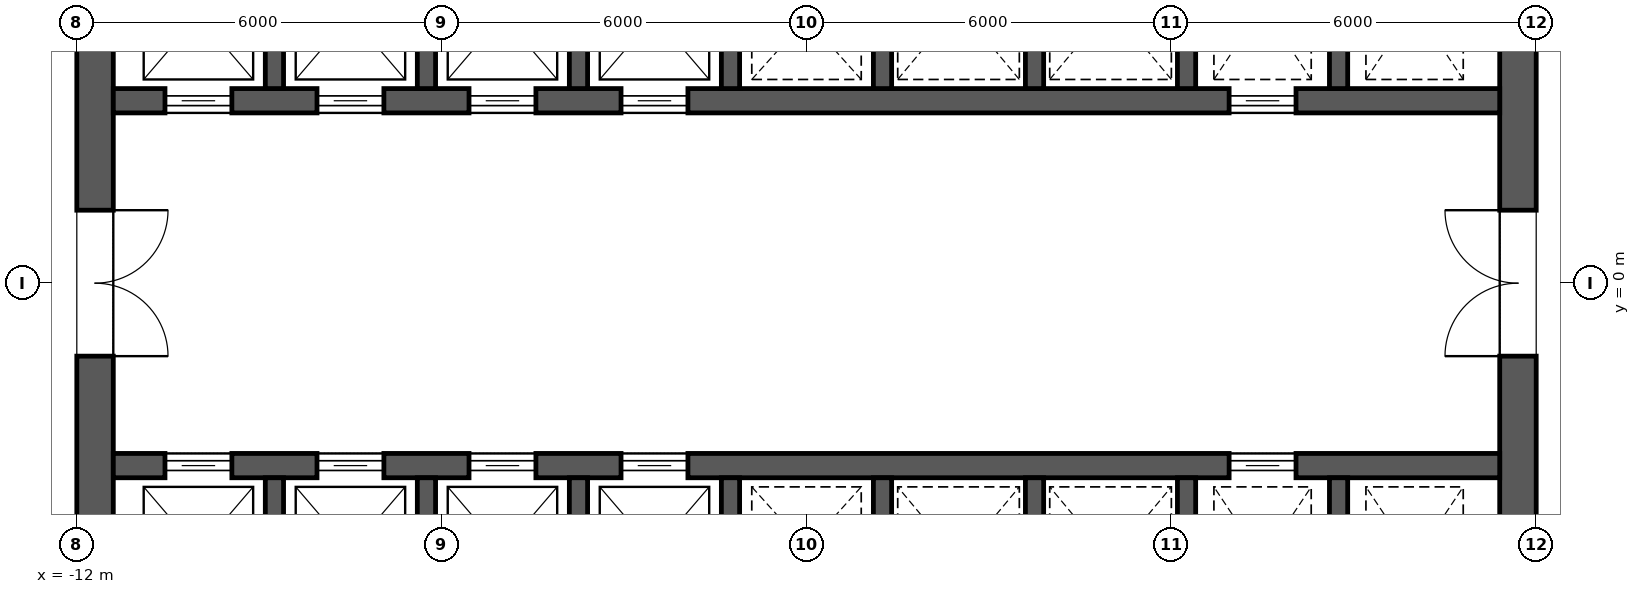
"""IFC4 building model, lengths in metres.
Left out: names, types, materials, properties, quantities, classifications, styles, units other than length and angle.
Written with IfcOpenShell. Run it as: python <this file> out.ifc"""

import sys

from ifc_helpers import new_model, si_unit, direction, frame, frame_2d, origin, place, context, subcontext, project, spatial, rectangle, extrude, element, fill, save


model = new_model("IFC4")
c1 = context("Model", 3, precision=1e-05, world=origin(), true_north=direction((0.0, 1.0)))
c2 = subcontext(c1, "Body", "Model", "MODEL_VIEW")
j1 = project(units=[si_unit("LENGTHUNIT", "METRE"), si_unit("PLANEANGLEUNIT", "RADIAN")], contexts=[c1])
p1 = place(None, origin())
s1 = spatial("IfcSite", under=j1, at=p1, CompositionType="ELEMENT")
p2 = place(p1, origin())
s2 = spatial("IfcBuilding", under=s1, at=p2, CompositionType="ELEMENT")
p3 = place(p2, frame((0.0, 0.0, 57.1)))
s3 = spatial("IfcBuildingStorey", under=s2, at=p3, CompositionType="ELEMENT", Elevation=57.1)
p4 = place(p3, frame((11.7, -11.4, 0.0), z_axis=(0.0, 0.0, 1.0), x_axis=(0.0, 1.0, 0.0)))
e1 = element("IfcWall", 1, at=p4, inside=s3, PredefinedType="SHEAR", context=c2, shape_type="SweptSolid", body=[
    extrude(rectangle(XDim=22.8, YDim=0.6, at=frame_2d((11.4, 0.0))), origin(), (0.0, 0.0, 1.0), 4.2),
])
p5 = place(p4, frame((10.2, 0.0, 0.0)))
e2 = element("IfcOpeningElement", 2, at=p5, cuts=e1, PredefinedType="OPENING", context=c2, shape_type="SweptSolid", body=[
    extrude(rectangle(XDim=2.4, YDim=2.1, at=frame_2d((1.2, 1.05))), frame((0.0, 0.312, 0.0), z_axis=(0.0, -1.0, 0.0), x_axis=(1.0, 0.0, 0.0)), (0.0, 0.0, 1.0), 0.624),
])
p6 = place(p4, frame((19.5, 0.0, 0.0)))
e3 = element("IfcOpeningElement", 3, at=p6, cuts=e1, PredefinedType="OPENING", context=c2, shape_type="SweptSolid", body=[
    extrude(rectangle(XDim=1.2, YDim=2.1, at=frame_2d((0.6, 1.05))), frame((0.0, 0.312, 0.0), z_axis=(0.0, -1.0, 0.0), x_axis=(1.0, 0.0, 0.0)), (0.0, 0.0, 1.0), 0.624),
])
p7 = place(p4, frame((2.1, 0.0, 0.0)))
e4 = element("IfcOpeningElement", 4, at=p7, cuts=e1, PredefinedType="OPENING", context=c2, shape_type="SweptSolid", body=[
    extrude(rectangle(XDim=1.2, YDim=2.1, at=frame_2d((0.6, 1.05))), frame((0.0, 0.312, 0.0), z_axis=(0.0, -1.0, 0.0), x_axis=(1.0, 0.0, 0.0)), (0.0, 0.0, 1.0), 0.624),
])
p8 = place(p3, frame((-11.7, -11.4, 0.0), z_axis=(0.0, 0.0, 1.0), x_axis=(0.0, 1.0, 0.0)))
e5 = element("IfcWall", 5, at=p8, inside=s3, PredefinedType="SHEAR", context=c2, shape_type="SweptSolid", body=[
    extrude(rectangle(XDim=22.8, YDim=0.6, at=frame_2d((11.4, 0.0))), origin(), (0.0, 0.0, 1.0), 4.2),
])
p9 = place(p8, frame((10.2, 0.0, 0.0)))
e6 = element("IfcOpeningElement", 6, at=p9, cuts=e5, PredefinedType="OPENING", context=c2, shape_type="SweptSolid", body=[
    extrude(rectangle(XDim=2.4, YDim=2.1, at=frame_2d((1.2, 1.05))), frame((0.0, 0.312, 0.0), z_axis=(0.0, -1.0, 0.0), x_axis=(1.0, 0.0, 0.0)), (0.0, 0.0, 1.0), 0.624),
])
p10 = place(p8, frame((18.925, 0.0, 0.0)))
e7 = element("IfcOpeningElement", 7, at=p10, cuts=e5, PredefinedType="OPENING", context=c2, shape_type="SweptSolid", body=[
    extrude(rectangle(XDim=1.2, YDim=2.1, at=frame_2d((0.6, 1.05))), frame((0.0, 0.312, 0.0), z_axis=(0.0, -1.0, 0.0), x_axis=(1.0, 0.0, 0.0)), (0.0, 0.0, 1.0), 0.624),
])
p11 = place(p8, frame((2.675, 0.0, 0.0)))
e8 = element("IfcOpeningElement", 8, at=p11, cuts=e5, PredefinedType="OPENING", context=c2, shape_type="SweptSolid", body=[
    extrude(rectangle(XDim=1.2, YDim=2.1, at=frame_2d((0.6, 1.05))), frame((0.0, 0.312, 0.0), z_axis=(0.0, -1.0, 0.0), x_axis=(1.0, 0.0, 0.0)), (0.0, 0.0, 1.0), 0.624),
])
p12 = place(p3, frame((-11.4, 3.0, 0.0), z_axis=(0.0, 0.0, 1.0), x_axis=(1.0, 0.0, 0.0)))
e9 = element("IfcWall", 9, at=p12, inside=s3, PredefinedType="SHEAR", context=c2, shape_type="SweptSolid", body=[
    extrude(rectangle(XDim=22.8, YDim=0.4, at=frame_2d((11.4, 0.0))), origin(), (0.0, 0.0, 1.0), 4.2),
])
p13 = place(p12, frame((0.85, 0.0, 0.0)))
e10 = element("IfcOpeningElement", 10, at=p13, cuts=e9, PredefinedType="OPENING", context=c2, shape_type="SweptSolid", body=[
    extrude(rectangle(XDim=1.1, YDim=2.1, at=frame_2d((0.55, 1.05))), frame((0.0, 0.212, 0.0), z_axis=(0.0, -1.0, 0.0), x_axis=(1.0, 0.0, 0.0)), (0.0, 0.0, 1.0), 0.424),
])
p14 = place(p12, frame((3.35, 0.0, 0.0)))
e11 = element("IfcOpeningElement", 11, at=p14, cuts=e9, PredefinedType="OPENING", context=c2, shape_type="SweptSolid", body=[
    extrude(rectangle(XDim=1.1, YDim=2.1, at=frame_2d((0.55, 1.05))), frame((0.0, 0.212, 0.0), z_axis=(0.0, -1.0, 0.0), x_axis=(1.0, 0.0, 0.0)), (0.0, 0.0, 1.0), 0.424),
])
p15 = place(p12, frame((5.85, 0.0, 0.0)))
e12 = element("IfcOpeningElement", 12, at=p15, cuts=e9, PredefinedType="OPENING", context=c2, shape_type="SweptSolid", body=[
    extrude(rectangle(XDim=1.1, YDim=2.1, at=frame_2d((0.55, 1.05))), frame((0.0, 0.212, 0.0), z_axis=(0.0, -1.0, 0.0), x_axis=(1.0, 0.0, 0.0)), (0.0, 0.0, 1.0), 0.424),
])
p16 = place(p12, frame((8.35, 0.0, 0.0)))
e13 = element("IfcOpeningElement", 13, at=p16, cuts=e9, PredefinedType="OPENING", context=c2, shape_type="SweptSolid", body=[
    extrude(rectangle(XDim=1.1, YDim=2.1, at=frame_2d((0.55, 1.05))), frame((0.0, 0.212, 0.0), z_axis=(0.0, -1.0, 0.0), x_axis=(1.0, 0.0, 0.0)), (0.0, 0.0, 1.0), 0.424),
])
p17 = place(p12, frame((18.35, 0.0, 0.0)))
e14 = element("IfcOpeningElement", 14, at=p17, cuts=e9, PredefinedType="OPENING", context=c2, shape_type="SweptSolid", body=[
    extrude(rectangle(XDim=1.1, YDim=2.1, at=frame_2d((0.55, 1.05))), frame((0.0, 0.212, 0.0), z_axis=(0.0, -1.0, 0.0), x_axis=(1.0, 0.0, 0.0)), (0.0, 0.0, 1.0), 0.424),
])
for number, where, z_axis, x_axis in (
    (15, (-8.75, 3.2, 0.0), (0.0, 0.0, 1.0), (0.0, 1.0, 0.0)),
    (16, (-6.25, 3.2, 0.0), (0.0, 0.0, 1.0), (0.0, 1.0, 0.0)),
    (17, (-3.75, 3.2, 0.0), (0.0, 0.0, 1.0), (0.0, 1.0, 0.0)),
    (18, (-1.25, 3.2, 0.0), (0.0, 0.0, 1.0), (0.0, 1.0, 0.0)),
    (19, (1.25, 3.2, 0.0), (0.0, 0.0, 1.0), (0.0, 1.0, 0.0)),
    (20, (3.75, 3.2, 0.0), (0.0, 0.0, 1.0), (0.0, 1.0, 0.0)),
    (21, (6.25, 3.2, 0.0), (0.0, 0.0, 1.0), (0.0, 1.0, 0.0)),
    (22, (8.75, 3.2, 0.0), (0.0, 0.0, 1.0), (0.0, 1.0, 0.0)),
):
    element("IfcWall", number, at=place(p3, frame(where, z_axis=z_axis, x_axis=x_axis)), inside=s3, PredefinedType="SHEAR", context=c2, shape_type="SweptSolid", body=[
        extrude(rectangle(XDim=2.9, YDim=0.3, at=frame_2d((1.45, 0.0))), origin(), (0.0, 0.0, 1.0), 4.2),
    ])
p18 = place(p3, frame((-11.4, -3.0, 0.0), z_axis=(0.0, 0.0, 1.0), x_axis=(1.0, 0.0, 0.0)))
e23 = element("IfcWall", 23, at=p18, inside=s3, PredefinedType="SHEAR", context=c2, shape_type="SweptSolid", body=[
    extrude(rectangle(XDim=22.8, YDim=0.4, at=frame_2d((11.4, 0.0))), origin(), (0.0, 0.0, 1.0), 4.2),
])
p19 = place(p18, frame((0.85, 0.0, 0.0)))
e24 = element("IfcOpeningElement", 24, at=p19, cuts=e23, PredefinedType="OPENING", context=c2, shape_type="SweptSolid", body=[
    extrude(rectangle(XDim=1.1, YDim=2.1, at=frame_2d((0.55, 1.05))), frame((0.0, 0.212, 0.0), z_axis=(0.0, -1.0, 0.0), x_axis=(1.0, 0.0, 0.0)), (0.0, 0.0, 1.0), 0.424),
])
p20 = place(p18, frame((3.35, 0.0, 0.0)))
e25 = element("IfcOpeningElement", 25, at=p20, cuts=e23, PredefinedType="OPENING", context=c2, shape_type="SweptSolid", body=[
    extrude(rectangle(XDim=1.1, YDim=2.1, at=frame_2d((0.55, 1.05))), frame((0.0, 0.212, 0.0), z_axis=(0.0, -1.0, 0.0), x_axis=(1.0, 0.0, 0.0)), (0.0, 0.0, 1.0), 0.424),
])
p21 = place(p18, frame((5.85, 0.0, 0.0)))
e26 = element("IfcOpeningElement", 26, at=p21, cuts=e23, PredefinedType="OPENING", context=c2, shape_type="SweptSolid", body=[
    extrude(rectangle(XDim=1.1, YDim=2.1, at=frame_2d((0.55, 1.05))), frame((0.0, 0.212, 0.0), z_axis=(0.0, -1.0, 0.0), x_axis=(1.0, 0.0, 0.0)), (0.0, 0.0, 1.0), 0.424),
])
p22 = place(p18, frame((8.35, 0.0, 0.0)))
e27 = element("IfcOpeningElement", 27, at=p22, cuts=e23, PredefinedType="OPENING", context=c2, shape_type="SweptSolid", body=[
    extrude(rectangle(XDim=1.1, YDim=2.1, at=frame_2d((0.55, 1.05))), frame((0.0, 0.212, 0.0), z_axis=(0.0, -1.0, 0.0), x_axis=(1.0, 0.0, 0.0)), (0.0, 0.0, 1.0), 0.424),
])
p23 = place(p18, frame((18.35, 0.0, 0.0)))
e28 = element("IfcOpeningElement", 28, at=p23, cuts=e23, PredefinedType="OPENING", context=c2, shape_type="SweptSolid", body=[
    extrude(rectangle(XDim=1.1, YDim=2.1, at=frame_2d((0.55, 1.05))), frame((0.0, 0.212, 0.0), z_axis=(0.0, -1.0, 0.0), x_axis=(1.0, 0.0, 0.0)), (0.0, 0.0, 1.0), 0.424),
])
for number, where, z_axis, x_axis in (
    (29, (-8.75, -6.1, 0.0), (0.0, 0.0, 1.0), (0.0, 1.0, 0.0)),
    (30, (-6.25, -6.1, 0.0), (0.0, 0.0, 1.0), (0.0, 1.0, 0.0)),
    (31, (-3.75, -6.1, 0.0), (0.0, 0.0, 1.0), (0.0, 1.0, 0.0)),
    (32, (-1.25, -6.1, 0.0), (0.0, 0.0, 1.0), (0.0, 1.0, 0.0)),
    (33, (1.25, -6.1, 0.0), (0.0, 0.0, 1.0), (0.0, 1.0, 0.0)),
    (34, (3.75, -6.1, 0.0), (0.0, 0.0, 1.0), (0.0, 1.0, 0.0)),
    (35, (6.25, -6.1, 0.0), (0.0, 0.0, 1.0), (0.0, 1.0, 0.0)),
    (36, (8.75, -6.1, 0.0), (0.0, 0.0, 1.0), (0.0, 1.0, 0.0)),
):
    element("IfcWall", number, at=place(p3, frame(where, z_axis=z_axis, x_axis=x_axis)), inside=s3, PredefinedType="SHEAR", context=c2, shape_type="SweptSolid", body=[
        extrude(rectangle(XDim=2.9, YDim=0.3, at=frame_2d((1.45, 0.0))), origin(), (0.0, 0.0, 1.0), 4.2),
    ])
p24 = place(p13, origin())
e37 = element("IfcDoor", 37, at=p24, inside=s3, OperationType="SLIDING_TO_LEFT", PredefinedType="DOOR", context=c2, shape_type="SweptSolid", body=[
    extrude(rectangle(XDim=1.1, YDim=2.1, at=frame_2d((0.55, 1.05))), frame((0.0, 0.025, 0.0), z_axis=(0.0, -1.0, 0.0), x_axis=(1.0, 0.0, 0.0)), (0.0, 0.0, 1.0), 0.05),
])
fill(e10, e37)
p25 = place(p14, origin())
e38 = element("IfcDoor", 38, at=p25, inside=s3, OperationType="SLIDING_TO_LEFT", PredefinedType="DOOR", context=c2, shape_type="SweptSolid", body=[
    extrude(rectangle(XDim=1.1, YDim=2.1, at=frame_2d((0.55, 1.05))), frame((0.0, 0.025, 0.0), z_axis=(0.0, -1.0, 0.0), x_axis=(1.0, 0.0, 0.0)), (0.0, 0.0, 1.0), 0.05),
])
fill(e11, e38)
p26 = place(p15, origin())
e39 = element("IfcDoor", 39, at=p26, inside=s3, OperationType="SLIDING_TO_LEFT", PredefinedType="DOOR", context=c2, shape_type="SweptSolid", body=[
    extrude(rectangle(XDim=1.1, YDim=2.1, at=frame_2d((0.55, 1.05))), frame((0.0, 0.025, 0.0), z_axis=(0.0, -1.0, 0.0), x_axis=(1.0, 0.0, 0.0)), (0.0, 0.0, 1.0), 0.05),
])
fill(e12, e39)
p27 = place(p16, origin())
e40 = element("IfcDoor", 40, at=p27, inside=s3, OperationType="SLIDING_TO_LEFT", PredefinedType="DOOR", context=c2, shape_type="SweptSolid", body=[
    extrude(rectangle(XDim=1.1, YDim=2.1, at=frame_2d((0.55, 1.05))), frame((0.0, 0.025, 0.0), z_axis=(0.0, -1.0, 0.0), x_axis=(1.0, 0.0, 0.0)), (0.0, 0.0, 1.0), 0.05),
])
fill(e13, e40)
p28 = place(p19, origin())
e41 = element("IfcDoor", 41, at=p28, inside=s3, OperationType="SLIDING_TO_LEFT", PredefinedType="DOOR", context=c2, shape_type="SweptSolid", body=[
    extrude(rectangle(XDim=1.1, YDim=2.1, at=frame_2d((0.55, 1.05))), frame((0.0, 0.025, 0.0), z_axis=(0.0, -1.0, 0.0), x_axis=(1.0, 0.0, 0.0)), (0.0, 0.0, 1.0), 0.05),
])
fill(e24, e41)
p29 = place(p20, origin())
e42 = element("IfcDoor", 42, at=p29, inside=s3, OperationType="SLIDING_TO_LEFT", PredefinedType="DOOR", context=c2, shape_type="SweptSolid", body=[
    extrude(rectangle(XDim=1.1, YDim=2.1, at=frame_2d((0.55, 1.05))), frame((0.0, 0.025, 0.0), z_axis=(0.0, -1.0, 0.0), x_axis=(1.0, 0.0, 0.0)), (0.0, 0.0, 1.0), 0.05),
])
fill(e25, e42)
p30 = place(p21, origin())
e43 = element("IfcDoor", 43, at=p30, inside=s3, OperationType="SLIDING_TO_LEFT", PredefinedType="DOOR", context=c2, shape_type="SweptSolid", body=[
    extrude(rectangle(XDim=1.1, YDim=2.1, at=frame_2d((0.55, 1.05))), frame((0.0, 0.025, 0.0), z_axis=(0.0, -1.0, 0.0), x_axis=(1.0, 0.0, 0.0)), (0.0, 0.0, 1.0), 0.05),
])
fill(e26, e43)
p31 = place(p22, origin())
e44 = element("IfcDoor", 44, at=p31, inside=s3, OperationType="SLIDING_TO_LEFT", PredefinedType="DOOR", context=c2, shape_type="SweptSolid", body=[
    extrude(rectangle(XDim=1.1, YDim=2.1, at=frame_2d((0.55, 1.05))), frame((0.0, 0.025, 0.0), z_axis=(0.0, -1.0, 0.0), x_axis=(1.0, 0.0, 0.0)), (0.0, 0.0, 1.0), 0.05),
])
fill(e27, e44)
p32 = place(p17, origin())
e45 = element("IfcDoor", 45, at=p32, inside=s3, OperationType="SLIDING_TO_LEFT", PredefinedType="DOOR", context=c2, shape_type="SweptSolid", body=[
    extrude(rectangle(XDim=1.1, YDim=2.1, at=frame_2d((0.55, 1.05))), frame((0.0, 0.025, 0.0), z_axis=(0.0, -1.0, 0.0), x_axis=(1.0, 0.0, 0.0)), (0.0, 0.0, 1.0), 0.05),
])
fill(e14, e45)
p33 = place(p23, origin())
e46 = element("IfcDoor", 46, at=p33, inside=s3, OperationType="SLIDING_TO_LEFT", PredefinedType="DOOR", context=c2, shape_type="SweptSolid", body=[
    extrude(rectangle(XDim=1.1, YDim=2.1, at=frame_2d((0.55, 1.05))), frame((0.0, 0.025, 0.0), z_axis=(0.0, -1.0, 0.0), x_axis=(1.0, 0.0, 0.0)), (0.0, 0.0, 1.0), 0.05),
])
fill(e28, e46)
p34 = place(p9, frame((2.4, 0.0, 0.0), z_axis=(0.0, 0.0, 1.0), x_axis=(-1.0, 0.0, 0.0)))
e47 = element("IfcDoor", 47, at=p34, inside=s3, OperationType="DOUBLE_DOOR_SINGLE_SWING", PredefinedType="DOOR", context=c2, shape_type="SweptSolid", body=[
    extrude(rectangle(XDim=2.4, YDim=2.1, at=frame_2d((1.2, 1.05))), frame((0.0, 0.025, 0.0), z_axis=(0.0, -1.0, 0.0), x_axis=(1.0, 0.0, 0.0)), (0.0, 0.0, 1.0), 0.05),
])
fill(e6, e47)
p35 = place(p5, origin())
e48 = element("IfcDoor", 48, at=p35, inside=s3, OperationType="DOUBLE_DOOR_SINGLE_SWING", PredefinedType="DOOR", context=c2, shape_type="SweptSolid", body=[
    extrude(rectangle(XDim=2.4, YDim=2.1, at=frame_2d((1.2, 1.05))), frame((0.0, 0.025, 0.0), z_axis=(0.0, -1.0, 0.0), x_axis=(1.0, 0.0, 0.0)), (0.0, 0.0, 1.0), 0.05),
])
fill(e2, e48)
save(model, sys.argv[1])
